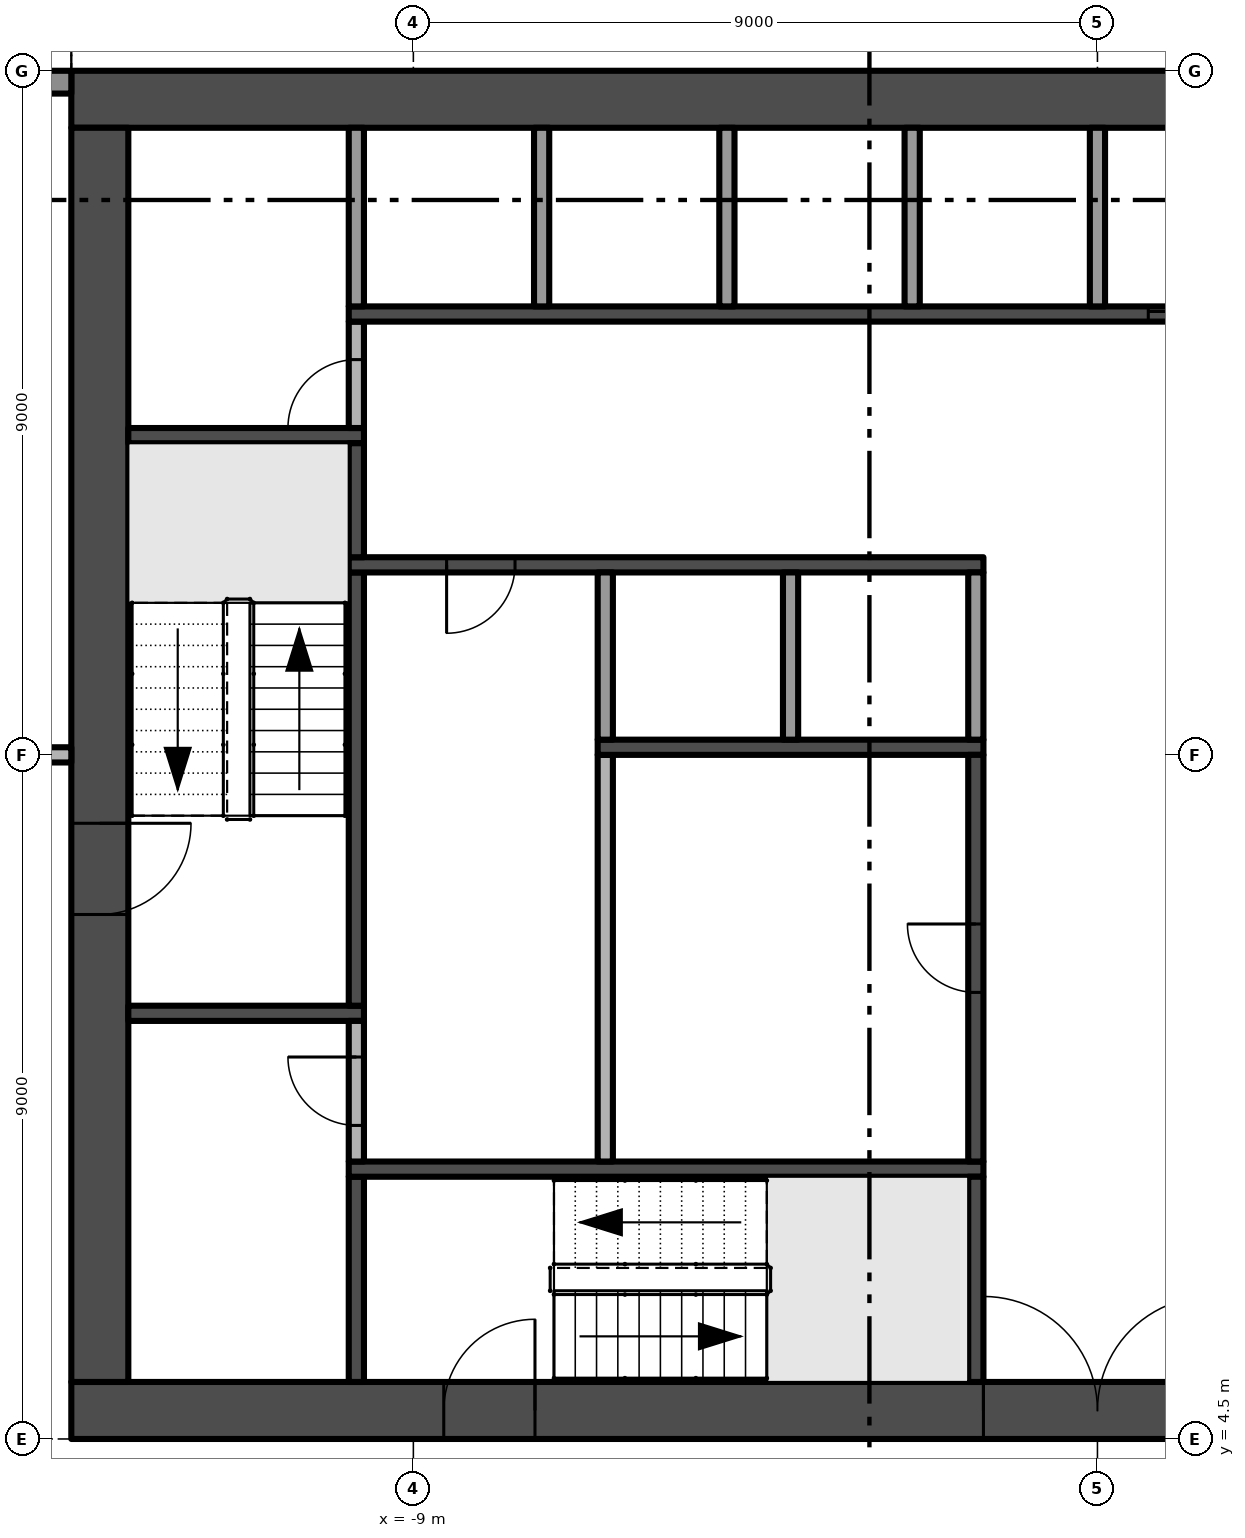
"""IFC4 building model, lengths in metres.
Left out: names, types, materials, properties, quantities, classifications, styles, units other than length and angle.
Written with IfcOpenShell. Run it as: python <this file> out.ifc"""

import sys

from ifc_helpers import new_model, si_unit, direction, frame, frame_2d, origin, place, context, subcontext, project, spatial, rectangle, extrude, element, fill, save


model = new_model("IFC4")
c1 = context("Model", 3, precision=1e-05, world=origin(), true_north=direction((0.0, 1.0)))
c2 = subcontext(c1, "Body", "Model", "MODEL_VIEW")
j1 = project(units=[si_unit("LENGTHUNIT", "METRE"), si_unit("PLANEANGLEUNIT", "RADIAN")], contexts=[c1])
p1 = place(None, origin())
s1 = spatial("IfcSite", under=j1, at=p1, CompositionType="ELEMENT")
p2 = place(p1, origin())
s2 = spatial("IfcBuilding", under=s1, at=p2, CompositionType="ELEMENT")
p3 = place(p2, frame((0.0, 0.0, 125.0)))
s3 = spatial("IfcBuildingStorey", under=s2, at=p3, CompositionType="ELEMENT", Elevation=125.0)
p4 = place(p3, frame((-13.5, 4.875, -0.3), z_axis=(0.0, 0.0, 1.0), x_axis=(1.0, 0.0, 0.0)))
e1 = element("IfcWall", 1, at=p4, inside=s3, PredefinedType="SHEAR", context=c2, shape_type="SweptSolid", body=[
    extrude(rectangle(XDim=27.0, YDim=0.75, at=frame_2d((13.5, 0.0))), origin(), (0.0, 0.0, 1.0), 3.8),
])
p5 = place(p4, frame((12.0, 0.0, 0.3)))
e2 = element("IfcOpeningElement", 2, at=p5, cuts=e1, PredefinedType="OPENING", context=c2, shape_type="SweptSolid", body=[
    extrude(rectangle(XDim=3.0, YDim=2.4, at=frame_2d((1.5, 1.2))), frame((0.0, 0.385, 0.0), z_axis=(0.0, -1.0, 0.0), x_axis=(1.0, 0.0, 0.0)), (0.0, 0.0, 1.0), 0.77),
])
p6 = place(p4, frame((4.9, 0.0, 0.3)))
e3 = element("IfcOpeningElement", 3, at=p6, cuts=e1, PredefinedType="OPENING", context=c2, shape_type="SweptSolid", body=[
    extrude(rectangle(XDim=1.2, YDim=2.2, at=frame_2d((0.6, 1.1))), frame((0.0, 0.385, 0.0), z_axis=(0.0, -1.0, 0.0), x_axis=(1.0, 0.0, 0.0)), (0.0, 0.0, 1.0), 0.77),
])
p7 = place(p4, frame((20.75, 0.0, 0.3)))
e4 = element("IfcOpeningElement", 4, at=p7, cuts=e1, PredefinedType="OPENING", context=c2, shape_type="SweptSolid", body=[
    extrude(rectangle(XDim=1.5, YDim=2.2, at=frame_2d((0.75, 1.1))), frame((0.0, 0.385, 0.0), z_axis=(0.0, -1.0, 0.0), x_axis=(1.0, 0.0, 0.0)), (0.0, 0.0, 1.0), 0.77),
])
p8 = place(p4, frame((17.4, 0.0, 0.3)))
e5 = element("IfcOpeningElement", 5, at=p8, cuts=e1, PredefinedType="OPENING", context=c2, shape_type="SweptSolid", body=[
    extrude(rectangle(XDim=1.2, YDim=2.2, at=frame_2d((0.6, 1.1))), frame((0.0, 0.385, 0.0), z_axis=(0.0, -1.0, 0.0), x_axis=(1.0, 0.0, 0.0)), (0.0, 0.0, 1.0), 0.77),
])
p9 = place(p3, frame((13.5, 22.125, -0.3), z_axis=(0.0, 0.0, 1.0), x_axis=(-1.0, 0.0, 0.0)))
e6 = element("IfcWall", 6, at=p9, inside=s3, PredefinedType="SHEAR", context=c2, shape_type="SweptSolid", body=[
    extrude(rectangle(XDim=27.0, YDim=0.75, at=frame_2d((13.5, 0.0))), origin(), (0.0, 0.0, 1.0), 3.8),
])
p10 = place(p3, frame((-13.125, 21.75, -0.3), z_axis=(0.0, 0.0, 1.0), x_axis=(0.0, -1.0, 0.0)))
e7 = element("IfcWall", 7, at=p10, inside=s3, PredefinedType="SHEAR", context=c2, shape_type="SweptSolid", body=[
    extrude(rectangle(XDim=16.5, YDim=0.75, at=frame_2d((8.25, 0.0))), origin(), (0.0, 0.0, 1.0), 3.8),
])
p11 = place(p10, frame((9.15, 0.0, 0.3)))
e8 = element("IfcOpeningElement", 8, at=p11, cuts=e7, PredefinedType="OPENING", context=c2, shape_type="SweptSolid", body=[
    extrude(rectangle(XDim=1.2, YDim=2.2, at=frame_2d((0.6, 1.1))), frame((0.0, 0.385, 0.0), z_axis=(0.0, -1.0, 0.0), x_axis=(1.0, 0.0, 0.0)), (0.0, 0.0, 1.0), 0.77),
])
p12 = place(p3, frame((-16.8, 22.35, 0.0), z_axis=(0.0, 0.0, 1.0), x_axis=(1.0, 0.0, 0.0)))
e9 = element("IfcWall", 9, at=p12, inside=s3, PredefinedType="SOLIDWALL", context=c2, shape_type="SweptSolid", body=[
    extrude(rectangle(XDim=3.3, YDim=0.3, at=frame_2d((1.65, 0.0))), origin(), (0.0, 0.0, 1.0), 3.5),
])
p13 = place(p12, frame((0.8, 0.0, 0.0)))
e10 = element("IfcOpeningElement", 10, at=p13, cuts=e9, PredefinedType="OPENING", context=c2, shape_type="SweptSolid", body=[
    extrude(rectangle(XDim=1.8, YDim=2.4, at=frame_2d((0.9, 1.2))), frame((0.0, 0.16, 0.0), z_axis=(0.0, -1.0, 0.0), x_axis=(1.0, 0.0, 0.0)), (0.0, 0.0, 1.0), 0.32),
])
for number, where, z_axis, x_axis in (
    (11, (-12.75, 10.1, 0.0), (0.0, 0.0, 1.0), (1.0, 0.0, 0.0)),
    (12, (-12.75, 17.7, 0.0), (0.0, 0.0, 1.0), (1.0, 0.0, 0.0)),
):
    element("IfcWall", number, at=place(p3, frame(where, z_axis=z_axis, x_axis=x_axis)), inside=s3, PredefinedType="SHEAR", context=c2, shape_type="SweptSolid", body=[
        extrude(rectangle(XDim=3.1, YDim=0.2, at=frame_2d((1.55, 0.0))), origin(), (0.0, 0.0, 1.0), 3.5),
    ])
p14 = place(p3, frame((-9.75, 5.25, 0.0), z_axis=(0.0, 0.0, 1.0), x_axis=(0.0, 1.0, 0.0)))
e13 = element("IfcWall", 13, at=p14, inside=s3, PredefinedType="SHEAR", context=c2, shape_type="SweptSolid", body=[
    extrude(rectangle(XDim=2.7, YDim=0.2, at=frame_2d((1.35, 0.0))), origin(), (0.0, 0.0, 1.0), 3.5),
])
p15 = place(p3, frame((-9.85, 8.05, 0.0), z_axis=(0.0, 0.0, 1.0), x_axis=(1.0, 0.0, 0.0)))
e14 = element("IfcWall", 14, at=p15, inside=s3, PredefinedType="SHEAR", context=c2, shape_type="SweptSolid", body=[
    extrude(rectangle(XDim=8.35, YDim=0.2, at=frame_2d((4.175, 0.0))), origin(), (0.0, 0.0, 1.0), 3.5),
])
p16 = place(p3, frame((-9.75, 8.15, 0.0), z_axis=(0.0, 0.0, 1.0), x_axis=(0.0, 1.0, 0.0)))
e15 = element("IfcWall", 15, at=p16, inside=s3, PredefinedType="PARTITIONING", context=c2, shape_type="SweptSolid", body=[
    extrude(rectangle(XDim=1.85, YDim=0.2, at=frame_2d((0.925, 0.0))), origin(), (0.0, 0.0, 1.0), 3.5),
])
p17 = place(p16, frame((0.475, 0.0, 0.0)))
e16 = element("IfcOpeningElement", 16, at=p17, cuts=e15, PredefinedType="OPENING", context=c2, shape_type="SweptSolid", body=[
    extrude(rectangle(XDim=0.9, YDim=2.1, at=frame_2d((0.45, 1.05))), frame((0.0, 0.11, 0.0), z_axis=(0.0, -1.0, 0.0), x_axis=(1.0, 0.0, 0.0)), (0.0, 0.0, 1.0), 0.22),
])
p18 = place(p3, frame((-9.75, 10.2, 0.0), z_axis=(0.0, 0.0, 1.0), x_axis=(0.0, 1.0, 0.0)))
e17 = element("IfcWall", 17, at=p18, inside=s3, PredefinedType="SHEAR", context=c2, shape_type="SweptSolid", body=[
    extrude(rectangle(XDim=5.7, YDim=0.2, at=frame_2d((2.85, 0.0))), origin(), (0.0, 0.0, 1.0), 3.5),
])
p19 = place(p3, frame((-1.5, 16.0, 0.0), z_axis=(0.0, 0.0, 1.0), x_axis=(-1.0, 0.0, 0.0)))
e18 = element("IfcWall", 18, at=p19, inside=s3, PredefinedType="SHEAR", context=c2, shape_type="SweptSolid", body=[
    extrude(rectangle(XDim=8.35, YDim=0.2, at=frame_2d((4.175, 0.0))), origin(), (0.0, 0.0, 1.0), 3.5),
])
p20 = place(p19, frame((6.162, 0.0, 0.0)))
e19 = element("IfcOpeningElement", 19, at=p20, cuts=e18, PredefinedType="OPENING", context=c2, shape_type="SweptSolid", body=[
    extrude(rectangle(XDim=0.9, YDim=2.1, at=frame_2d((0.45, 1.05))), frame((0.0, 0.11, 0.0), z_axis=(0.0, -1.0, 0.0), x_axis=(1.0, 0.0, 0.0)), (0.0, 0.0, 1.0), 0.22),
])
p21 = place(p3, frame((-9.75, 16.1, 0.0), z_axis=(0.0, 0.0, 1.0), x_axis=(0.0, 1.0, 0.0)))
e20 = element("IfcWall", 20, at=p21, inside=s3, PredefinedType="SHEAR", context=c2, shape_type="SweptSolid", body=[
    extrude(rectangle(XDim=1.5, YDim=0.2, at=frame_2d((0.75, 0.0))), origin(), (0.0, 0.0, 1.0), 3.5),
])
p22 = place(p3, frame((-9.75, 17.8, 0.0), z_axis=(0.0, 0.0, 1.0), x_axis=(0.0, 1.0, 0.0)))
e21 = element("IfcWall", 21, at=p22, inside=s3, PredefinedType="PARTITIONING", context=c2, shape_type="SweptSolid", body=[
    extrude(rectangle(XDim=1.4, YDim=0.2, at=frame_2d((0.7, 0.0))), origin(), (0.0, 0.0, 1.0), 3.5),
])
p23 = place(p22, origin())
e22 = element("IfcOpeningElement", 22, at=p23, cuts=e21, PredefinedType="OPENING", context=c2, shape_type="SweptSolid", body=[
    extrude(rectangle(XDim=0.9, YDim=2.1, at=frame_2d((0.45, 1.05))), frame((0.0, 0.11, 0.0), z_axis=(0.0, -1.0, 0.0), x_axis=(1.0, 0.0, 0.0)), (0.0, 0.0, 1.0), 0.22),
])
p24 = place(p3, frame((-9.85, 19.3, 0.0), z_axis=(0.0, 0.0, 1.0), x_axis=(1.0, 0.0, 0.0)))
e23 = element("IfcWall", 23, at=p24, inside=s3, PredefinedType="SHEAR", context=c2, shape_type="SweptSolid", body=[
    extrude(rectangle(XDim=19.7, YDim=0.2, at=frame_2d((9.85, 0.0))), origin(), (0.0, 0.0, 1.0), 3.5),
])
p25 = place(p24, frame((10.519, 0.0, 0.0)))
e24 = element("IfcOpeningElement", 24, at=p25, cuts=e23, PredefinedType="OPENING", context=c2, shape_type="SweptSolid", body=[
    extrude(rectangle(XDim=1.1, YDim=2.1, at=frame_2d((0.55, 1.05))), frame((0.0, 0.11, 0.0), z_axis=(0.0, -1.0, 0.0), x_axis=(1.0, 0.0, 0.0)), (0.0, 0.0, 1.0), 0.22),
])
p26 = place(p24, frame((12.956, 0.0, 0.0)))
e25 = element("IfcOpeningElement", 25, at=p26, cuts=e23, PredefinedType="OPENING", context=c2, shape_type="SweptSolid", body=[
    extrude(rectangle(XDim=1.1, YDim=2.1, at=frame_2d((0.55, 1.05))), frame((0.0, 0.11, 0.0), z_axis=(0.0, -1.0, 0.0), x_axis=(1.0, 0.0, 0.0)), (0.0, 0.0, 1.0), 0.22),
])
p27 = place(p24, frame((15.394, 0.0, 0.0)))
e26 = element("IfcOpeningElement", 26, at=p27, cuts=e23, PredefinedType="OPENING", context=c2, shape_type="SweptSolid", body=[
    extrude(rectangle(XDim=1.1, YDim=2.1, at=frame_2d((0.55, 1.05))), frame((0.0, 0.11, 0.0), z_axis=(0.0, -1.0, 0.0), x_axis=(1.0, 0.0, 0.0)), (0.0, 0.0, 1.0), 0.22),
])
p28 = place(p24, frame((17.831, 0.0, 0.0)))
e27 = element("IfcOpeningElement", 27, at=p28, cuts=e23, PredefinedType="OPENING", context=c2, shape_type="SweptSolid", body=[
    extrude(rectangle(XDim=1.1, YDim=2.1, at=frame_2d((0.55, 1.05))), frame((0.0, 0.11, 0.0), z_axis=(0.0, -1.0, 0.0), x_axis=(1.0, 0.0, 0.0)), (0.0, 0.0, 1.0), 0.22),
])
for number, where, z_axis, x_axis in (
    (28, (-9.75, 19.4, 0.0), (0.0, 0.0, 1.0), (0.0, 1.0, 0.0)),
    (29, (-7.312, 19.4, 0.0), (0.0, 0.0, 1.0), (0.0, 1.0, 0.0)),
):
    element("IfcWall", number, at=place(p3, frame(where, z_axis=z_axis, x_axis=x_axis)), inside=s3, PredefinedType="PARTITIONING", context=c2, shape_type="SweptSolid", body=[
        extrude(rectangle(XDim=2.35, YDim=0.2, at=frame_2d((1.175, 0.0))), origin(), (0.0, 0.0, 1.0), 3.5),
    ])
p29 = place(p3, frame((-6.475, 8.15, 0.0), z_axis=(0.0, 0.0, 1.0), x_axis=(0.0, 1.0, 0.0)))
e30 = element("IfcWall", 30, at=p29, inside=s3, PredefinedType="PARTITIONING", context=c2, shape_type="SweptSolid", body=[
    extrude(rectangle(XDim=5.35, YDim=0.2, at=frame_2d((2.675, 0.0))), origin(), (0.0, 0.0, 1.0), 3.5),
])
p30 = place(p3, frame((-6.575, 13.6, 0.0), z_axis=(0.0, 0.0, 1.0), x_axis=(1.0, 0.0, 0.0)))
e31 = element("IfcWall", 31, at=p30, inside=s3, PredefinedType="SHEAR", context=c2, shape_type="SweptSolid", body=[
    extrude(rectangle(XDim=5.075, YDim=0.2, at=frame_2d((2.538, 0.0))), origin(), (0.0, 0.0, 1.0), 3.5),
])
p31 = place(p3, frame((-6.475, 13.7, 0.0), z_axis=(0.0, 0.0, 1.0), x_axis=(0.0, 1.0, 0.0)))
e32 = element("IfcWall", 32, at=p31, inside=s3, PredefinedType="PARTITIONING", context=c2, shape_type="SweptSolid", body=[
    extrude(rectangle(XDim=2.2, YDim=0.2, at=frame_2d((1.1, 0.0))), origin(), (0.0, 0.0, 1.0), 3.5),
])
p32 = place(p3, frame((-4.875, 19.4, 0.0), z_axis=(0.0, 0.0, 1.0), x_axis=(0.0, 1.0, 0.0)))
e33 = element("IfcWall", 33, at=p32, inside=s3, PredefinedType="PARTITIONING", context=c2, shape_type="SweptSolid", body=[
    extrude(rectangle(XDim=2.35, YDim=0.2, at=frame_2d((1.175, 0.0))), origin(), (0.0, 0.0, 1.0), 3.5),
])
p33 = place(p3, frame((-4.037, 13.7, 0.0), z_axis=(0.0, 0.0, 1.0), x_axis=(0.0, 1.0, 0.0)))
e34 = element("IfcWall", 34, at=p33, inside=s3, PredefinedType="PARTITIONING", context=c2, shape_type="SweptSolid", body=[
    extrude(rectangle(XDim=2.2, YDim=0.2, at=frame_2d((1.1, 0.0))), origin(), (0.0, 0.0, 1.0), 3.5),
])
p34 = place(p3, frame((-2.438, 19.4, 0.0), z_axis=(0.0, 0.0, 1.0), x_axis=(0.0, 1.0, 0.0)))
e35 = element("IfcWall", 35, at=p34, inside=s3, PredefinedType="PARTITIONING", context=c2, shape_type="SweptSolid", body=[
    extrude(rectangle(XDim=2.35, YDim=0.2, at=frame_2d((1.175, 0.0))), origin(), (0.0, 0.0, 1.0), 3.5),
])
p35 = place(p3, frame((-1.6, 5.25, 0.0), z_axis=(0.0, 0.0, 1.0), x_axis=(0.0, 1.0, 0.0)))
e36 = element("IfcWall", 36, at=p35, inside=s3, PredefinedType="SHEAR", context=c2, shape_type="SweptSolid", body=[
    extrude(rectangle(XDim=2.7, YDim=0.2, at=frame_2d((1.35, 0.0))), origin(), (0.0, 0.0, 1.0), 3.5),
])
p36 = place(p3, frame((-1.6, 8.15, 0.0), z_axis=(0.0, 0.0, 1.0), x_axis=(0.0, 1.0, 0.0)))
e37 = element("IfcWall", 37, at=p36, inside=s3, PredefinedType="SHEAR", context=c2, shape_type="SweptSolid", body=[
    extrude(rectangle(XDim=5.35, YDim=0.2, at=frame_2d((2.675, 0.0))), origin(), (0.0, 0.0, 1.0), 3.5),
])
p37 = place(p36, frame((2.225, 0.0, 0.0)))
e38 = element("IfcOpeningElement", 38, at=p37, cuts=e37, PredefinedType="OPENING", context=c2, shape_type="SweptSolid", body=[
    extrude(rectangle(XDim=0.9, YDim=2.1, at=frame_2d((0.45, 1.05))), frame((0.0, 0.11, 0.0), z_axis=(0.0, -1.0, 0.0), x_axis=(1.0, 0.0, 0.0)), (0.0, 0.0, 1.0), 0.22),
])
p38 = place(p3, frame((-1.6, 13.7, 0.0), z_axis=(0.0, 0.0, 1.0), x_axis=(0.0, 1.0, 0.0)))
e39 = element("IfcWall", 39, at=p38, inside=s3, PredefinedType="PARTITIONING", context=c2, shape_type="SweptSolid", body=[
    extrude(rectangle(XDim=2.2, YDim=0.2, at=frame_2d((1.1, 0.0))), origin(), (0.0, 0.0, 1.0), 3.5),
])
p39 = place(p3, frame((0.0, 19.4, 0.0), z_axis=(0.0, 0.0, 1.0), x_axis=(0.0, 1.0, 0.0)))
e40 = element("IfcWall", 40, at=p39, inside=s3, PredefinedType="PARTITIONING", context=c2, shape_type="SweptSolid", body=[
    extrude(rectangle(XDim=2.35, YDim=0.2, at=frame_2d((1.175, 0.0))), origin(), (0.0, 0.0, 1.0), 3.5),
])
p40 = place(p3, frame((-17.35, 13.5, 0.0), z_axis=(0.0, 0.0, 1.0), x_axis=(1.0, 0.0, 0.0)))
e41 = element("IfcWall", 41, at=p40, inside=s3, PredefinedType="PARTITIONING", context=c2, shape_type="SweptSolid", body=[
    extrude(rectangle(XDim=3.85, YDim=0.2, at=frame_2d((1.925, 0.0))), origin(), (0.0, 0.0, 1.0), 3.5),
])
p41 = place(p40, frame((1.35, 0.0, 0.0)))
e42 = element("IfcOpeningElement", 42, at=p41, cuts=e41, PredefinedType="OPENING", context=c2, shape_type="SweptSolid", body=[
    extrude(rectangle(XDim=0.9, YDim=2.1, at=frame_2d((0.45, 1.05))), frame((0.0, 0.11, 0.0), z_axis=(0.0, -1.0, 0.0), x_axis=(1.0, 0.0, 0.0)), (0.0, 0.0, 1.0), 0.22),
])
p42 = place(p5, frame((3.0, 0.0, 0.0), z_axis=(0.0, 0.0, 1.0), x_axis=(-1.0, 0.0, 0.0)))
e43 = element("IfcDoor", 43, at=p42, inside=s3, OperationType="DOUBLE_DOOR_SINGLE_SWING", PredefinedType="DOOR", context=c2, shape_type="SweptSolid", body=[
    extrude(rectangle(XDim=3.0, YDim=2.4, at=frame_2d((1.5, 1.2))), frame((0.0, 0.025, 0.0), z_axis=(0.0, -1.0, 0.0), x_axis=(1.0, 0.0, 0.0)), (0.0, 0.0, 1.0), 0.05),
])
fill(e2, e43)
p43 = place(p11, frame((1.2, 0.0, 0.0), z_axis=(0.0, 0.0, 1.0), x_axis=(-1.0, 0.0, 0.0)))
e44 = element("IfcDoor", 44, at=p43, inside=s3, OperationType="SINGLE_SWING_RIGHT", PredefinedType="DOOR", context=c2, shape_type="SweptSolid", body=[
    extrude(rectangle(XDim=1.2, YDim=2.2, at=frame_2d((0.6, 1.1))), frame((0.0, 0.025, 0.0), z_axis=(0.0, -1.0, 0.0), x_axis=(1.0, 0.0, 0.0)), (0.0, 0.0, 1.0), 0.05),
])
fill(e8, e44)
p44 = place(p6, frame((1.2, 0.0, 0.0), z_axis=(0.0, 0.0, 1.0), x_axis=(-1.0, 0.0, 0.0)))
e45 = element("IfcDoor", 45, at=p44, inside=s3, OperationType="SINGLE_SWING_LEFT", PredefinedType="DOOR", context=c2, shape_type="SweptSolid", body=[
    extrude(rectangle(XDim=1.2, YDim=2.2, at=frame_2d((0.6, 1.1))), frame((0.0, 0.025, 0.0), z_axis=(0.0, -1.0, 0.0), x_axis=(1.0, 0.0, 0.0)), (0.0, 0.0, 1.0), 0.05),
])
fill(e3, e45)
p45 = place(p25, origin())
e46 = element("IfcDoor", 46, at=p45, inside=s3, OperationType="SLIDING_TO_RIGHT", PredefinedType="DOOR", context=c2, shape_type="SweptSolid", body=[
    extrude(rectangle(XDim=1.1, YDim=2.1, at=frame_2d((0.55, 1.05))), frame((0.0, 0.025, 0.0), z_axis=(0.0, -1.0, 0.0), x_axis=(1.0, 0.0, 0.0)), (0.0, 0.0, 1.0), 0.05),
])
fill(e24, e46)
p46 = place(p20, origin())
e47 = element("IfcDoor", 47, at=p46, inside=s3, OperationType="SINGLE_SWING_RIGHT", PredefinedType="DOOR", context=c2, shape_type="SweptSolid", body=[
    extrude(rectangle(XDim=0.9, YDim=2.1, at=frame_2d((0.45, 1.05))), frame((0.0, 0.025, 0.0), z_axis=(0.0, -1.0, 0.0), x_axis=(1.0, 0.0, 0.0)), (0.0, 0.0, 1.0), 0.05),
])
fill(e19, e47)
p47 = place(p37, origin())
e48 = element("IfcDoor", 48, at=p47, inside=s3, OperationType="SINGLE_SWING_RIGHT", PredefinedType="DOOR", context=c2, shape_type="SweptSolid", body=[
    extrude(rectangle(XDim=0.9, YDim=2.1, at=frame_2d((0.45, 1.05))), frame((0.0, 0.025, 0.0), z_axis=(0.0, -1.0, 0.0), x_axis=(1.0, 0.0, 0.0)), (0.0, 0.0, 1.0), 0.05),
])
fill(e38, e48)
p48 = place(p23, origin())
e49 = element("IfcDoor", 49, at=p48, inside=s3, OperationType="SINGLE_SWING_LEFT", PredefinedType="DOOR", context=c2, shape_type="SweptSolid", body=[
    extrude(rectangle(XDim=0.9, YDim=2.1, at=frame_2d((0.45, 1.05))), frame((0.0, 0.025, 0.0), z_axis=(0.0, -1.0, 0.0), x_axis=(1.0, 0.0, 0.0)), (0.0, 0.0, 1.0), 0.05),
])
fill(e22, e49)
p49 = place(p17, origin())
e50 = element("IfcDoor", 50, at=p49, inside=s3, OperationType="SINGLE_SWING_RIGHT", PredefinedType="DOOR", context=c2, shape_type="SweptSolid", body=[
    extrude(rectangle(XDim=0.9, YDim=2.1, at=frame_2d((0.45, 1.05))), frame((0.0, 0.025, 0.0), z_axis=(0.0, -1.0, 0.0), x_axis=(1.0, 0.0, 0.0)), (0.0, 0.0, 1.0), 0.05),
])
fill(e16, e50)
save(model, sys.argv[1])
